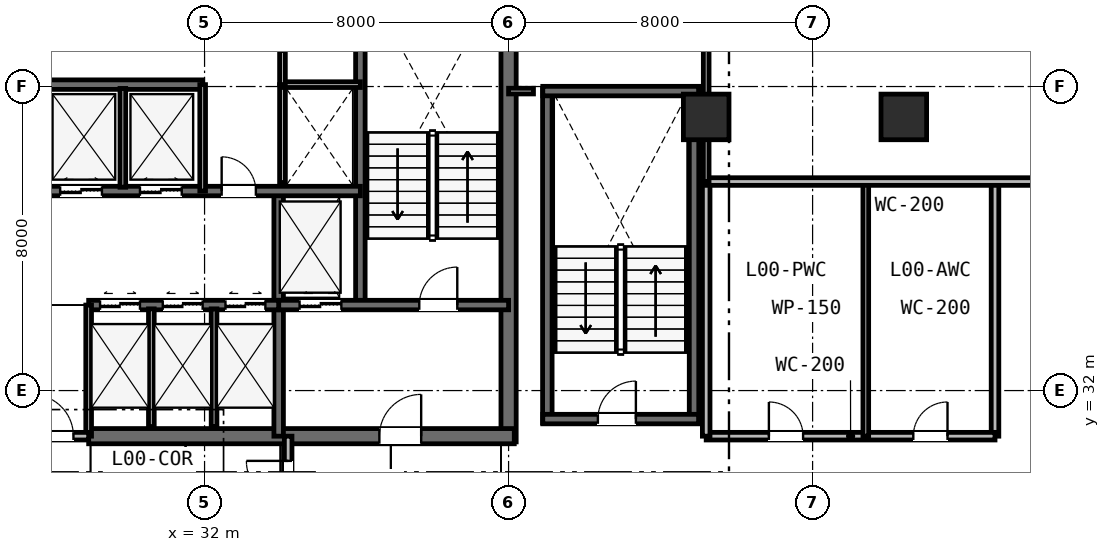
"""IFC4 building model, lengths in metres.
Left out: names, types, materials, properties, quantities, classifications, styles, units other than length and angle.
Written with IfcOpenShell. Run it as: python <this file> out.ifc"""

import sys

from ifc_helpers import new_model, si_unit, direction, frame, frame_2d, origin, origin_2d, place, context, subcontext, project, spatial, rectangle, extrude, element, fill, save


model = new_model("IFC4")
c1 = context("Model", 3, precision=1e-05, world=origin(), true_north=direction((0.0, 1.0)))
c2 = subcontext(c1, "Body", "Model", "MODEL_VIEW")
j1 = project(units=[si_unit("LENGTHUNIT", "METRE"), si_unit("PLANEANGLEUNIT", "RADIAN")], contexts=[c1])
p1 = place(None, origin())
s1 = spatial("IfcSite", under=j1, at=p1, CompositionType="ELEMENT")
p2 = place(p1, origin())
s2 = spatial("IfcBuilding", under=s1, at=p2, CompositionType="ELEMENT")
p3 = place(p2, origin())
s3 = spatial("IfcBuildingStorey", under=s2, at=p3, CompositionType="ELEMENT", Elevation=0.0)
p4 = place(p3, frame((40.0, 30.65, 0.0), z_axis=(0.0, 0.0, 1.0), x_axis=(0.0, 1.0, 0.0)))
e1 = element("IfcWall", 1, at=p4, inside=s3, PredefinedType="SHEAR", context=c2, shape_type="SweptSolid", body=[
    extrude(rectangle(XDim=12.3, YDim=0.4, at=frame_2d((6.15, 0.0))), origin(), (0.0, 0.0, 1.0), 6.0),
])
p5 = place(p3, frame((28.95, 30.8, 0.0), z_axis=(0.0, 0.0, 1.0), x_axis=(1.0, 0.0, 0.0)))
e2 = element("IfcWall", 2, at=p5, inside=s3, PredefinedType="SHEAR", context=c2, shape_type="SweptSolid", body=[
    extrude(rectangle(XDim=11.2, YDim=0.4, at=frame_2d((5.6, 0.0))), origin(), (0.0, 0.0, 1.0), 6.0),
])
p6 = place(p5, frame((7.65, 0.0, 0.0)))
e3 = element("IfcOpeningElement", 3, at=p6, cuts=e2, PredefinedType="OPENING", context=c2, shape_type="SweptSolid", body=[
    extrude(rectangle(XDim=1.1, YDim=2.15, at=frame_2d((0.55, 1.075))), frame((0.0, 0.21, 0.0), z_axis=(0.0, -1.0, 0.0), x_axis=(1.0, 0.0, 0.0)), (0.0, 0.0, 1.0), 0.42),
])
p7 = place(p3, frame((36.1, 34.25, 0.0), z_axis=(0.0, 0.0, 1.0), x_axis=(0.0, 1.0, 0.0)))
e4 = element("IfcWall", 4, at=p7, inside=s3, PredefinedType="SHEAR", context=c2, shape_type="SweptSolid", body=[
    extrude(rectangle(XDim=8.65, YDim=0.25, at=frame_2d((4.325, 0.0))), origin(), (0.0, 0.0, 1.0), 6.0),
])
p8 = place(p3, frame((33.95, 30.8, 0.0), z_axis=(0.0, 0.0, 1.0), x_axis=(0.0, 1.0, 0.0)))
e5 = element("IfcWall", 5, at=p8, inside=s3, PredefinedType="SHEAR", context=c2, shape_type="SweptSolid", body=[
    extrude(rectangle(XDim=6.45, YDim=0.25, at=frame_2d((3.225, 0.0))), origin(), (0.0, 0.0, 1.0), 6.0),
])
p9 = place(p3, frame((33.95, 34.25, 0.0), z_axis=(0.0, 0.0, 1.0), x_axis=(1.0, 0.0, 0.0)))
e6 = element("IfcWall", 6, at=p9, inside=s3, PredefinedType="SHEAR", context=c2, shape_type="SweptSolid", body=[
    extrude(rectangle(XDim=6.05, YDim=0.25, at=frame_2d((3.025, 0.0))), origin(), (0.0, 0.0, 1.0), 6.0),
])
p10 = place(p9, frame((3.7, 0.0, 0.0)))
e7 = element("IfcOpeningElement", 7, at=p10, cuts=e6, PredefinedType="OPENING", context=c2, shape_type="SweptSolid", body=[
    extrude(rectangle(XDim=1.0, YDim=2.15, at=frame_2d((0.5, 1.075))), frame((0.0, 0.135, 0.0), z_axis=(0.0, -1.0, 0.0), x_axis=(1.0, 0.0, 0.0)), (0.0, 0.0, 1.0), 0.27),
])
p11 = place(p9, frame((0.55, 0.0, 0.0)))
e8 = element("IfcOpeningElement", 8, at=p11, cuts=e6, PredefinedType="OPENING", context=c2, shape_type="SweptSolid", body=[
    extrude(rectangle(XDim=1.1, YDim=2.15, at=frame_2d((0.55, 1.075))), frame((0.0, 0.135, 0.0), z_axis=(0.0, -1.0, 0.0), x_axis=(1.0, 0.0, 0.0)), (0.0, 0.0, 1.0), 0.27),
])
p12 = place(p3, frame((28.95, 34.25, 0.0), z_axis=(0.0, 0.0, 1.0), x_axis=(1.0, 0.0, 0.0)))
e9 = element("IfcWall", 9, at=p12, inside=s3, PredefinedType="SHEAR", context=c2, shape_type="SweptSolid", body=[
    extrude(rectangle(XDim=5.0, YDim=0.25, at=frame_2d((2.5, 0.0))), origin(), (0.0, 0.0, 1.0), 6.0),
])
p13 = place(p12, frame((0.3, 0.0, 0.0)))
e10 = element("IfcOpeningElement", 10, at=p13, cuts=e9, PredefinedType="OPENING", context=c2, shape_type="SweptSolid", body=[
    extrude(rectangle(XDim=1.05, YDim=2.15, at=frame_2d((0.525, 1.075))), frame((0.0, 0.135, 0.0), z_axis=(0.0, -1.0, 0.0), x_axis=(1.0, 0.0, 0.0)), (0.0, 0.0, 1.0), 0.27),
])
p14 = place(p12, frame((1.95, 0.0, 0.0)))
e11 = element("IfcOpeningElement", 11, at=p14, cuts=e9, PredefinedType="OPENING", context=c2, shape_type="SweptSolid", body=[
    extrude(rectangle(XDim=1.05, YDim=2.15, at=frame_2d((0.525, 1.075))), frame((0.0, 0.135, 0.0), z_axis=(0.0, -1.0, 0.0), x_axis=(1.0, 0.0, 0.0)), (0.0, 0.0, 1.0), 0.27),
])
p15 = place(p12, frame((3.6, 0.0, 0.0)))
e12 = element("IfcOpeningElement", 12, at=p15, cuts=e9, PredefinedType="OPENING", context=c2, shape_type="SweptSolid", body=[
    extrude(rectangle(XDim=1.05, YDim=2.15, at=frame_2d((0.525, 1.075))), frame((0.0, 0.135, 0.0), z_axis=(0.0, -1.0, 0.0), x_axis=(1.0, 0.0, 0.0)), (0.0, 0.0, 1.0), 0.27),
])
p16 = place(p3, frame((19.9, 37.25, 0.0), z_axis=(0.0, 0.0, 1.0), x_axis=(1.0, 0.0, 0.0)))
e13 = element("IfcWall", 13, at=p16, inside=s3, PredefinedType="SHEAR", context=c2, shape_type="SweptSolid", body=[
    extrude(rectangle(XDim=16.2, YDim=0.25, at=frame_2d((8.1, 0.0))), origin(), (0.0, 0.0, 1.0), 6.0),
])
p17 = place(p16, frame((12.55, 0.0, 0.0)))
e14 = element("IfcOpeningElement", 14, at=p17, cuts=e13, PredefinedType="OPENING", context=c2, shape_type="SweptSolid", body=[
    extrude(rectangle(XDim=0.9, YDim=2.15, at=frame_2d((0.45, 1.075))), frame((0.0, 0.135, 0.0), z_axis=(0.0, -1.0, 0.0), x_axis=(1.0, 0.0, 0.0)), (0.0, 0.0, 1.0), 0.27),
])
p18 = place(p16, frame((2.5, 0.0, 0.0)))
e15 = element("IfcOpeningElement", 15, at=p18, cuts=e13, PredefinedType="OPENING", context=c2, shape_type="SweptSolid", body=[
    extrude(rectangle(XDim=1.05, YDim=2.15, at=frame_2d((0.525, 1.075))), frame((0.0, 0.135, 0.0), z_axis=(0.0, -1.0, 0.0), x_axis=(1.0, 0.0, 0.0)), (0.0, 0.0, 1.0), 0.27),
])
p19 = place(p16, frame((4.4, 0.0, 0.0)))
e16 = element("IfcOpeningElement", 16, at=p19, cuts=e13, PredefinedType="OPENING", context=c2, shape_type="SweptSolid", body=[
    extrude(rectangle(XDim=1.05, YDim=2.15, at=frame_2d((0.525, 1.075))), frame((0.0, 0.135, 0.0), z_axis=(0.0, -1.0, 0.0), x_axis=(1.0, 0.0, 0.0)), (0.0, 0.0, 1.0), 0.27),
])
p20 = place(p16, frame((6.3, 0.0, 0.0)))
e17 = element("IfcOpeningElement", 17, at=p20, cuts=e13, PredefinedType="OPENING", context=c2, shape_type="SweptSolid", body=[
    extrude(rectangle(XDim=1.05, YDim=2.15, at=frame_2d((0.525, 1.075))), frame((0.0, 0.135, 0.0), z_axis=(0.0, -1.0, 0.0), x_axis=(1.0, 0.0, 0.0)), (0.0, 0.0, 1.0), 0.27),
])
p21 = place(p16, frame((8.3, 0.0, 0.0)))
e18 = element("IfcOpeningElement", 18, at=p21, cuts=e13, PredefinedType="OPENING", context=c2, shape_type="SweptSolid", body=[
    extrude(rectangle(XDim=1.1, YDim=2.15, at=frame_2d((0.55, 1.075))), frame((0.0, 0.135, 0.0), z_axis=(0.0, -1.0, 0.0), x_axis=(1.0, 0.0, 0.0)), (0.0, 0.0, 1.0), 0.27),
])
p22 = place(p16, frame((10.4, 0.0, 0.0)))
e19 = element("IfcOpeningElement", 19, at=p22, cuts=e13, PredefinedType="OPENING", context=c2, shape_type="SweptSolid", body=[
    extrude(rectangle(XDim=1.1, YDim=2.15, at=frame_2d((0.55, 1.075))), frame((0.0, 0.135, 0.0), z_axis=(0.0, -1.0, 0.0), x_axis=(1.0, 0.0, 0.0)), (0.0, 0.0, 1.0), 0.27),
])
p23 = place(p3, frame((19.9, 40.05, 0.0), z_axis=(0.0, 0.0, 1.0), x_axis=(1.0, 0.0, 0.0)))
e20 = element("IfcWall", 20, at=p23, inside=s3, PredefinedType="SHEAR", context=c2, shape_type="SweptSolid", body=[
    extrude(rectangle(XDim=12.05, YDim=0.25, at=frame_2d((6.025, 0.0))), origin(), (0.0, 0.0, 1.0), 6.0),
])
for number, where, z_axis, x_axis in (
    (21, (41.02, 31.15, 0.0), (0.0, 0.0, 1.0), (0.0, 1.0, 0.0)),
    (22, (44.88, 31.15, 0.0), (0.0, 0.0, 1.0), (0.0, 1.0, 0.0)),
):
    element("IfcWall", number, at=place(p3, frame(where, z_axis=z_axis, x_axis=x_axis)), inside=s3, PredefinedType="SHEAR", context=c2, shape_type="SweptSolid", body=[
        extrude(rectangle(XDim=8.8, YDim=0.25, at=frame_2d((4.4, 0.0))), origin(), (0.0, 0.0, 1.0), 6.0),
    ])
p24 = place(p3, frame((40.9, 39.88, 0.0), z_axis=(0.0, 0.0, 1.0), x_axis=(1.0, 0.0, 0.0)))
e23 = element("IfcWall", 23, at=p24, inside=s3, PredefinedType="SHEAR", context=c2, shape_type="SweptSolid", body=[
    extrude(rectangle(XDim=4.1, YDim=0.25, at=frame_2d((2.05, 0.0))), origin(), (0.0, 0.0, 1.0), 6.0),
])
p25 = place(p3, frame((40.9, 31.25, 0.0), z_axis=(0.0, 0.0, 1.0), x_axis=(1.0, 0.0, 0.0)))
e24 = element("IfcWall", 24, at=p25, inside=s3, PredefinedType="SHEAR", context=c2, shape_type="SweptSolid", body=[
    extrude(rectangle(XDim=4.1, YDim=0.25, at=frame_2d((2.05, 0.0))), origin(), (0.0, 0.0, 1.0), 6.0),
])
p26 = place(p25, frame((1.45, 0.0, 0.0)))
e25 = element("IfcOpeningElement", 25, at=p26, cuts=e24, PredefinedType="OPENING", context=c2, shape_type="SweptSolid", body=[
    extrude(rectangle(XDim=1.0, YDim=2.15, at=frame_2d((0.5, 1.075))), frame((0.0, 0.135, 0.0), z_axis=(0.0, -1.0, 0.0), x_axis=(1.0, 0.0, 0.0)), (0.0, 0.0, 1.0), 0.27),
])
for number, where, z_axis, x_axis in (
    (26, (45.2, 39.2, 0.0), (0.0, 0.0, 1.0), (1.0, 0.0, 0.0)),
    (27, (50.4, 39.2, 0.0), (0.0, 0.0, 1.0), (1.0, 0.0, 0.0)),
):
    element("IfcColumn", number, at=place(p3, frame(where, z_axis=z_axis, x_axis=x_axis)), inside=s3, PredefinedType="COLUMN", context=c2, shape_type="SweptSolid", body=[
        extrude(rectangle(XDim=1.2, YDim=1.2, at=origin_2d()), origin(), (0.0, 0.0, 1.0), 6.0),
    ])
p27 = place(p3, frame((28.95, 30.8, 0.0), z_axis=(0.0, 0.0, 1.0), x_axis=(0.0, 1.0, 0.0)))
e28 = element("IfcWall", 28, at=p27, inside=s3, PredefinedType="PLUMBINGWALL", context=c2, shape_type="SweptSolid", body=[
    extrude(rectangle(XDim=3.45, YDim=0.15, at=frame_2d((1.725, 0.0))), origin(), (0.0, 0.0, 1.0), 5.41),
])
p28 = place(p3, frame((27.05, 30.8, 0.0), z_axis=(0.0, 0.0, 1.0), x_axis=(1.0, 0.0, 0.0)))
e29 = element("IfcWall", 29, at=p28, inside=s3, PredefinedType="PARTITIONING", context=c2, shape_type="SweptSolid", body=[
    extrude(rectangle(XDim=1.9, YDim=0.2, at=frame_2d((0.95, 0.0))), origin(), (0.0, 0.0, 1.0), 5.41),
])
p29 = place(p28, frame((0.4, 0.0, 0.0)))
e30 = element("IfcOpeningElement", 30, at=p29, cuts=e29, PredefinedType="OPENING", context=c2, shape_type="SweptSolid", body=[
    extrude(rectangle(XDim=1.1, YDim=2.15, at=frame_2d((0.55, 1.075))), frame((0.0, 0.11, 0.0), z_axis=(0.0, -1.0, 0.0), x_axis=(1.0, 0.0, 0.0)), (0.0, 0.0, 1.0), 0.22),
])
for number, where, z_axis, x_axis in (
    (31, (30.6, 31.05, 0.0), (0.0, 0.0, 1.0), (0.0, 1.0, 0.0)),
    (32, (32.25, 31.05, 0.0), (0.0, 0.0, 1.0), (0.0, 1.0, 0.0)),
):
    element("IfcWall", number, at=place(p3, frame(where, z_axis=z_axis, x_axis=x_axis)), inside=s3, PredefinedType="PLUMBINGWALL", context=c2, shape_type="SweptSolid", body=[
        extrude(rectangle(XDim=3.1, YDim=0.15, at=frame_2d((1.55, 0.0))), origin(), (0.0, 0.0, 1.0), 5.67),
    ])
p30 = place(p3, frame((31.95, 37.25, 0.0), z_axis=(0.0, 0.0, 1.0), x_axis=(0.0, 1.0, 0.0)))
e33 = element("IfcWall", 33, at=p30, inside=s3, PredefinedType="PLUMBINGWALL", context=c2, shape_type="SweptSolid", body=[
    extrude(rectangle(XDim=2.8, YDim=0.15, at=frame_2d((1.4, 0.0))), origin(), (0.0, 0.0, 1.0), 5.67),
])
p31 = place(p3, frame((29.85, 37.35, 0.0), z_axis=(0.0, 0.0, 1.0), x_axis=(0.0, 1.0, 0.0)))
e34 = element("IfcWall", 34, at=p31, inside=s3, PredefinedType="PLUMBINGWALL", context=c2, shape_type="SweptSolid", body=[
    extrude(rectangle(XDim=2.6, YDim=0.15, at=frame_2d((1.3, 0.0))), origin(), (0.0, 0.0, 1.0), 5.67),
])
p32 = place(p3, frame((34.05, 37.473, 0.0), z_axis=(0.0, 0.0, 1.0), x_axis=(0.0, 1.0, 0.0)))
e35 = element("IfcWall", 35, at=p32, inside=s3, PredefinedType="PLUMBINGWALL", context=c2, shape_type="SweptSolid", body=[
    extrude(rectangle(XDim=2.577, YDim=0.15, at=frame_2d((1.288, 0.0))), origin(), (0.0, 0.0, 1.0), 5.67),
])
p33 = place(p3, frame((34.05, 40.05, 0.0), z_axis=(0.0, 0.0, 1.0), x_axis=(1.0, 0.0, 0.0)))
e36 = element("IfcWall", 36, at=p33, inside=s3, PredefinedType="PARTITIONING", context=c2, shape_type="SweptSolid", body=[
    extrude(rectangle(XDim=2.05, YDim=0.15, at=frame_2d((1.025, 0.0))), origin(), (0.0, 0.0, 1.0), 5.67),
])
p34 = place(p3, frame((34.05, 40.05, 0.0), z_axis=(0.0, 0.0, 1.0), x_axis=(0.0, 1.0, 0.0)))
e37 = element("IfcWall", 37, at=p34, inside=s3, PredefinedType="PARTITIONING", context=c2, shape_type="SweptSolid", body=[
    extrude(rectangle(XDim=2.63, YDim=0.15, at=frame_2d((1.315, 0.0))), origin(), (0.0, 0.0, 1.0), 5.67),
])
p35 = place(p34, frame((0.865, 0.0, 0.0)))
e38 = element("IfcOpeningElement", 38, at=p35, cuts=e37, PredefinedType="OPENING", context=c2, shape_type="SweptSolid", body=[
    extrude(rectangle(XDim=0.9, YDim=2.15, at=frame_2d((0.45, 1.075))), frame((0.0, 0.085, 0.0), z_axis=(0.0, -1.0, 0.0), x_axis=(1.0, 0.0, 0.0)), (0.0, 0.0, 1.0), 0.17),
])
p36 = place(p3, frame((34.2, 28.4, 0.0), z_axis=(0.0, 0.0, 1.0), x_axis=(0.0, 1.0, 0.0)))
e39 = element("IfcWall", 39, at=p36, inside=s3, PredefinedType="PARTITIONING", context=c2, shape_type="SweptSolid", body=[
    extrude(rectangle(XDim=2.4, YDim=0.2, at=frame_2d((1.2, 0.0))), origin(), (0.0, 0.0, 1.0), 5.26),
])
p37 = place(p36, frame((0.65, 0.0, 0.0)))
e40 = element("IfcOpeningElement", 40, at=p37, cuts=e39, PredefinedType="OPENING", context=c2, shape_type="SweptSolid", body=[
    extrude(rectangle(XDim=1.1, YDim=2.15, at=frame_2d((0.55, 1.075))), frame((0.0, 0.11, 0.0), z_axis=(0.0, -1.0, 0.0), x_axis=(1.0, 0.0, 0.0)), (0.0, 0.0, 1.0), 0.22),
])
p38 = place(p3, frame((52.8, 30.8, 0.0), z_axis=(0.0, 0.0, 1.0), x_axis=(0.0, 1.0, 0.0)))
e41 = element("IfcWall", 41, at=p38, inside=s3, PredefinedType="PARTITIONING", context=c2, shape_type="SweptSolid", body=[
    extrude(rectangle(XDim=6.7, YDim=0.2, at=frame_2d((3.35, 0.0))), origin(), (0.0, 0.0, 1.0), 5.02),
])
p39 = place(p3, frame((45.2, 30.8, 0.0), z_axis=(0.0, 0.0, 1.0), x_axis=(1.0, 0.0, 0.0)))
e42 = element("IfcWall", 42, at=p39, inside=s3, PredefinedType="PARTITIONING", context=c2, shape_type="SweptSolid", body=[
    extrude(rectangle(XDim=7.6, YDim=0.2, at=frame_2d((3.8, 0.0))), origin(), (0.0, 0.0, 1.0), 5.02),
])
p40 = place(p39, frame((1.65, 0.0, 0.0)))
e43 = element("IfcOpeningElement", 43, at=p40, cuts=e42, PredefinedType="OPENING", context=c2, shape_type="SweptSolid", body=[
    extrude(rectangle(XDim=0.9, YDim=2.15, at=frame_2d((0.45, 1.075))), frame((0.0, 0.11, 0.0), z_axis=(0.0, -1.0, 0.0), x_axis=(1.0, 0.0, 0.0)), (0.0, 0.0, 1.0), 0.22),
])
p41 = place(p39, frame((5.45, 0.0, 0.0)))
e44 = element("IfcOpeningElement", 44, at=p41, cuts=e42, PredefinedType="OPENING", context=c2, shape_type="SweptSolid", body=[
    extrude(rectangle(XDim=0.9, YDim=2.15, at=frame_2d((0.45, 1.075))), frame((0.0, 0.11, 0.0), z_axis=(0.0, -1.0, 0.0), x_axis=(1.0, 0.0, 0.0)), (0.0, 0.0, 1.0), 0.22),
])
p42 = place(p3, frame((45.2, 30.8, 0.0), z_axis=(0.0, 0.0, 1.0), x_axis=(0.0, 1.0, 0.0)))
e45 = element("IfcWall", 45, at=p42, inside=s3, PredefinedType="PARTITIONING", context=c2, shape_type="SweptSolid", body=[
    extrude(rectangle(XDim=6.7, YDim=0.2, at=frame_2d((3.35, 0.0))), origin(), (0.0, 0.0, 1.0), 5.02),
])
p43 = place(p3, frame((49.4, 30.8, 0.0), z_axis=(0.0, 0.0, 1.0), x_axis=(0.0, 1.0, 0.0)))
e46 = element("IfcWall", 46, at=p43, inside=s3, PredefinedType="PARTITIONING", context=c2, shape_type="SweptSolid", body=[
    extrude(rectangle(XDim=6.7, YDim=0.15, at=frame_2d((3.35, 0.0))), origin(), (0.0, 0.0, 1.0), 5.02),
])
p44 = place(p3, frame((45.2, 37.5, 0.0), z_axis=(0.0, 0.0, 1.0), x_axis=(1.0, 0.0, 0.0)))
e47 = element("IfcWall", 47, at=p44, inside=s3, PredefinedType="PARTITIONING", context=c2, shape_type="SweptSolid", body=[
    extrude(rectangle(XDim=10.7, YDim=0.2, at=frame_2d((5.35, 0.0))), origin(), (0.0, 0.0, 1.0), 5.02),
])
p45 = place(p44, frame((8.7, 0.0, 0.0)))
e48 = element("IfcOpeningElement", 48, at=p45, cuts=e47, PredefinedType="OPENING", context=c2, shape_type="SweptSolid", body=[
    extrude(rectangle(XDim=0.9, YDim=2.15, at=frame_2d((0.45, 1.075))), frame((0.0, 0.11, 0.0), z_axis=(0.0, -1.0, 0.0), x_axis=(1.0, 0.0, 0.0)), (0.0, 0.0, 1.0), 0.22),
])
p46 = place(p3, frame((45.2, 37.5, 0.0), z_axis=(0.0, 0.0, 1.0), x_axis=(0.0, 1.0, 0.0)))
e49 = element("IfcWall", 49, at=p46, inside=s3, PredefinedType="PARTITIONING", context=c2, shape_type="SweptSolid", body=[
    extrude(rectangle(XDim=10.4, YDim=0.15, at=frame_2d((5.2, 0.0))), origin(), (0.0, 0.0, 1.0), 5.02),
])
p47 = place(p3, frame((40.0, 39.88, 0.0), z_axis=(0.0, 0.0, 1.0), x_axis=(1.0, 0.0, 0.0)))
e50 = element("IfcWall", 50, at=p47, inside=s3, PredefinedType="PARTITIONING", context=c2, shape_type="SweptSolid", body=[
    extrude(rectangle(XDim=0.655, YDim=0.15, at=frame_2d((0.328, 0.0))), origin(), (0.0, 0.0, 1.0), 5.67),
])
p48 = place(p29, origin())
e51 = element("IfcDoor", 51, at=p48, inside=s3, OperationType="SINGLE_SWING_LEFT", PredefinedType="DOOR", context=c2, shape_type="SweptSolid", body=[
    extrude(rectangle(XDim=1.1, YDim=2.15, at=frame_2d((0.55, 1.075))), frame((0.0, 0.025, 0.0), z_axis=(0.0, -1.0, 0.0), x_axis=(1.0, 0.0, 0.0)), (0.0, 0.0, 1.0), 0.05),
])
fill(e30, e51)
p49 = place(p10, origin())
e52 = element("IfcDoor", 52, at=p49, inside=s3, OperationType="SINGLE_SWING_RIGHT", PredefinedType="DOOR", context=c2, shape_type="SweptSolid", body=[
    extrude(rectangle(XDim=1.0, YDim=2.15, at=frame_2d((0.5, 1.075))), frame((0.0, 0.025, 0.0), z_axis=(0.0, -1.0, 0.0), x_axis=(1.0, 0.0, 0.0)), (0.0, 0.0, 1.0), 0.05),
])
fill(e7, e52)
p50 = place(p6, origin())
e53 = element("IfcDoor", 53, at=p50, inside=s3, OperationType="SINGLE_SWING_RIGHT", PredefinedType="DOOR", context=c2, shape_type="SweptSolid", body=[
    extrude(rectangle(XDim=1.1, YDim=2.15, at=frame_2d((0.55, 1.075))), frame((0.0, 0.025, 0.0), z_axis=(0.0, -1.0, 0.0), x_axis=(1.0, 0.0, 0.0)), (0.0, 0.0, 1.0), 0.05),
])
fill(e3, e53)
p51 = place(p26, origin())
e54 = element("IfcDoor", 54, at=p51, inside=s3, OperationType="SINGLE_SWING_RIGHT", PredefinedType="DOOR", context=c2, shape_type="SweptSolid", body=[
    extrude(rectangle(XDim=1.0, YDim=2.15, at=frame_2d((0.5, 1.075))), frame((0.0, 0.025, 0.0), z_axis=(0.0, -1.0, 0.0), x_axis=(1.0, 0.0, 0.0)), (0.0, 0.0, 1.0), 0.05),
])
fill(e25, e54)
p52 = place(p17, origin())
e55 = element("IfcDoor", 55, at=p52, inside=s3, OperationType="SINGLE_SWING_LEFT", PredefinedType="DOOR", context=c2, shape_type="SweptSolid", body=[
    extrude(rectangle(XDim=0.9, YDim=2.15, at=frame_2d((0.45, 1.075))), frame((0.0, 0.025, 0.0), z_axis=(0.0, -1.0, 0.0), x_axis=(1.0, 0.0, 0.0)), (0.0, 0.0, 1.0), 0.05),
])
fill(e14, e55)
p53 = place(p37, origin())
e56 = element("IfcDoor", 56, at=p53, inside=s3, OperationType="SINGLE_SWING_RIGHT", PredefinedType="DOOR", context=c2, shape_type="SweptSolid", body=[
    extrude(rectangle(XDim=1.1, YDim=2.15, at=frame_2d((0.55, 1.075))), frame((0.0, 0.025, 0.0), z_axis=(0.0, -1.0, 0.0), x_axis=(1.0, 0.0, 0.0)), (0.0, 0.0, 1.0), 0.05),
])
fill(e40, e56)
p54 = place(p40, origin())
e57 = element("IfcDoor", 57, at=p54, inside=s3, OperationType="SINGLE_SWING_LEFT", PredefinedType="DOOR", context=c2, shape_type="SweptSolid", body=[
    extrude(rectangle(XDim=0.9, YDim=2.15, at=frame_2d((0.45, 1.075))), frame((0.0, 0.025, 0.0), z_axis=(0.0, -1.0, 0.0), x_axis=(1.0, 0.0, 0.0)), (0.0, 0.0, 1.0), 0.05),
])
fill(e43, e57)
p55 = place(p41, origin())
e58 = element("IfcDoor", 58, at=p55, inside=s3, OperationType="SINGLE_SWING_RIGHT", PredefinedType="DOOR", context=c2, shape_type="SweptSolid", body=[
    extrude(rectangle(XDim=0.9, YDim=2.15, at=frame_2d((0.45, 1.075))), frame((0.0, 0.025, 0.0), z_axis=(0.0, -1.0, 0.0), x_axis=(1.0, 0.0, 0.0)), (0.0, 0.0, 1.0), 0.05),
])
fill(e44, e58)
p56 = place(p11, origin())
e59 = element("IfcDoor", 59, at=p56, inside=s3, OperationType="DOUBLE_DOOR_SLIDING", PredefinedType="DOOR", context=c2, shape_type="SweptSolid", body=[
    extrude(rectangle(XDim=1.1, YDim=2.15, at=frame_2d((0.55, 1.075))), frame((0.0, 0.025, 0.0), z_axis=(0.0, -1.0, 0.0), x_axis=(1.0, 0.0, 0.0)), (0.0, 0.0, 1.0), 0.05),
])
fill(e8, e59)
p57 = place(p13, origin())
e60 = element("IfcDoor", 60, at=p57, inside=s3, OperationType="DOUBLE_DOOR_SLIDING", PredefinedType="DOOR", context=c2, shape_type="SweptSolid", body=[
    extrude(rectangle(XDim=1.05, YDim=2.15, at=frame_2d((0.525, 1.075))), frame((0.0, 0.025, 0.0), z_axis=(0.0, -1.0, 0.0), x_axis=(1.0, 0.0, 0.0)), (0.0, 0.0, 1.0), 0.05),
])
fill(e10, e60)
p58 = place(p14, origin())
e61 = element("IfcDoor", 61, at=p58, inside=s3, OperationType="DOUBLE_DOOR_SLIDING", PredefinedType="DOOR", context=c2, shape_type="SweptSolid", body=[
    extrude(rectangle(XDim=1.05, YDim=2.15, at=frame_2d((0.525, 1.075))), frame((0.0, 0.025, 0.0), z_axis=(0.0, -1.0, 0.0), x_axis=(1.0, 0.0, 0.0)), (0.0, 0.0, 1.0), 0.05),
])
fill(e11, e61)
p59 = place(p15, origin())
e62 = element("IfcDoor", 62, at=p59, inside=s3, OperationType="DOUBLE_DOOR_SLIDING", PredefinedType="DOOR", context=c2, shape_type="SweptSolid", body=[
    extrude(rectangle(XDim=1.05, YDim=2.15, at=frame_2d((0.525, 1.075))), frame((0.0, 0.025, 0.0), z_axis=(0.0, -1.0, 0.0), x_axis=(1.0, 0.0, 0.0)), (0.0, 0.0, 1.0), 0.05),
])
fill(e12, e62)
p60 = place(p21, origin())
e63 = element("IfcDoor", 63, at=p60, inside=s3, OperationType="DOUBLE_DOOR_SLIDING", PredefinedType="DOOR", context=c2, shape_type="SweptSolid", body=[
    extrude(rectangle(XDim=1.1, YDim=2.15, at=frame_2d((0.55, 1.075))), frame((0.0, 0.025, 0.0), z_axis=(0.0, -1.0, 0.0), x_axis=(1.0, 0.0, 0.0)), (0.0, 0.0, 1.0), 0.05),
])
fill(e18, e63)
p61 = place(p22, origin())
e64 = element("IfcDoor", 64, at=p61, inside=s3, OperationType="DOUBLE_DOOR_SLIDING", PredefinedType="DOOR", context=c2, shape_type="SweptSolid", body=[
    extrude(rectangle(XDim=1.1, YDim=2.15, at=frame_2d((0.55, 1.075))), frame((0.0, 0.025, 0.0), z_axis=(0.0, -1.0, 0.0), x_axis=(1.0, 0.0, 0.0)), (0.0, 0.0, 1.0), 0.05),
])
fill(e19, e64)
save(model, sys.argv[1])
